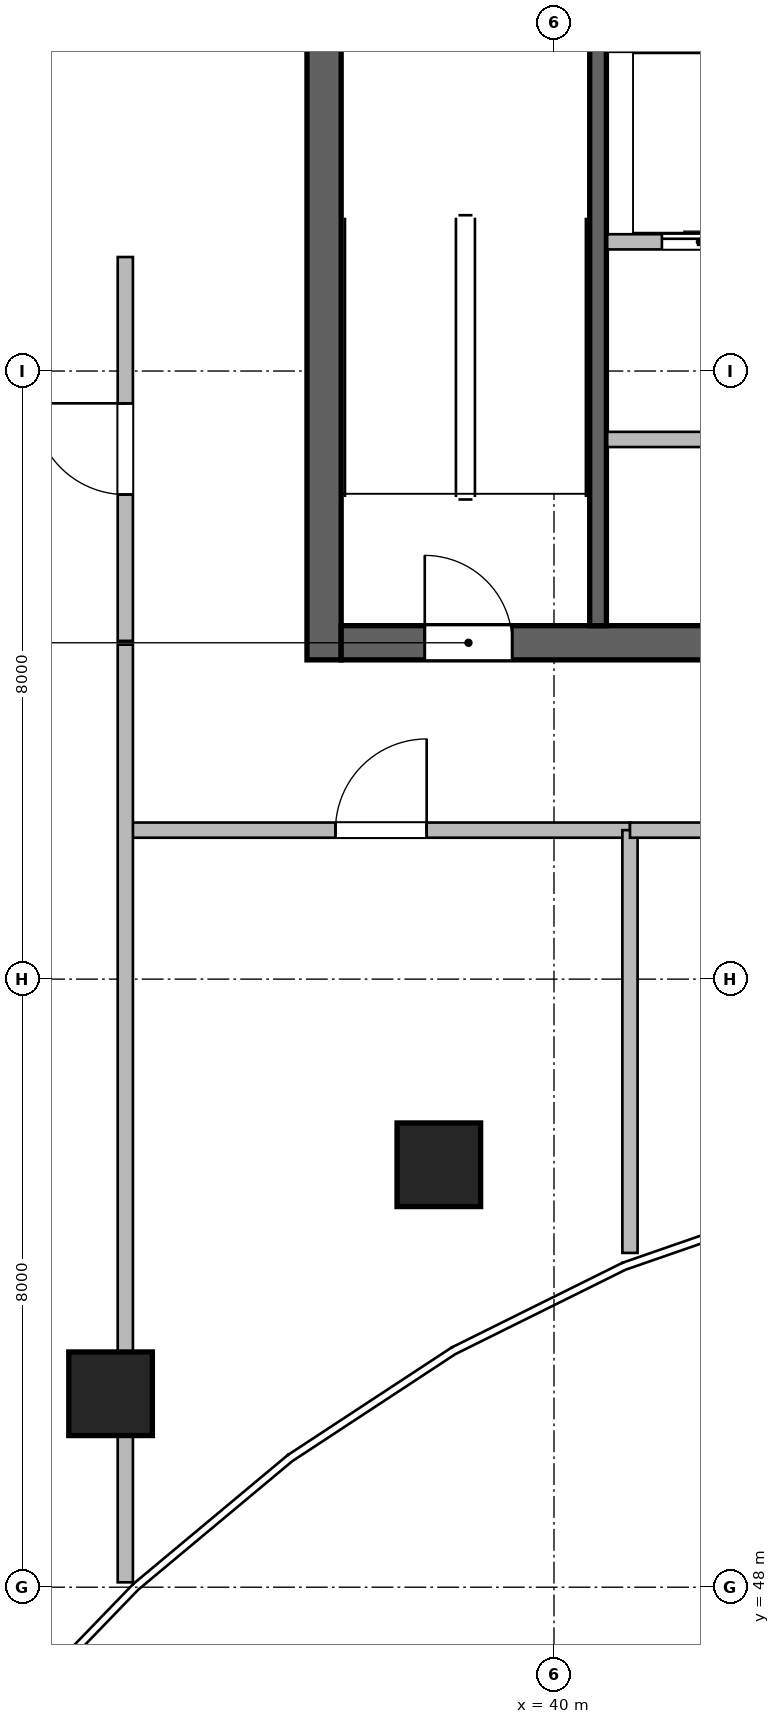
"""IFC4 building model, lengths in metres.
Left out: names, types, materials, properties, quantities, classifications, styles, units other than length and angle.
Written with IfcOpenShell. Run it as: python <this file> out.ifc"""

import sys

from ifc_helpers import new_model, si_unit, direction, frame, frame_2d, origin, origin_2d, place, context, subcontext, project, spatial, rectangle, circle, extrude, source, transform, mapped, element, fill, save


model = new_model("IFC4")
c1 = context("Model", 3, precision=1e-05, world=origin(), true_north=direction((0.0, 1.0)))
c2 = subcontext(c1, "Body", "Model", "MODEL_VIEW")
j1 = project(units=[si_unit("LENGTHUNIT", "METRE"), si_unit("PLANEANGLEUNIT", "RADIAN")], contexts=[c1])
p1 = place(None, origin())
s1 = spatial("IfcSite", under=j1, at=p1, CompositionType="ELEMENT")
p2 = place(p1, origin())
s2 = spatial("IfcBuilding", under=s1, at=p2, CompositionType="ELEMENT")
p3 = place(p2, frame((0.0, 0.0, 189.6)))
s3 = spatial("IfcBuildingStorey", under=s2, at=p3, CompositionType="ELEMENT", Elevation=189.6)
m1 = source(origin(), c2, "Body", "SweptSolid", [
    extrude(rectangle(XDim=12.0, YDim=0.45, at=frame_2d((6.0, 0.0))), origin(), (0.0, 0.0, 1.0), 4.8),
])
p4 = place(p3, frame((36.975, 60.2, 0.0), z_axis=(0.0, 0.0, 1.0), x_axis=(0.0, 1.0, 0.0)))
e1 = element("IfcWall", 1, at=p4, inside=s3, PredefinedType="SHEAR", context=c2, shape_type="MappedRepresentation", body=[
    mapped(m1, transform((0.0, 0.0, 0.0), scale=1.0)),
])
m2 = source(origin(), c2, "Body", "SweptSolid", [
    extrude(rectangle(XDim=21.6, YDim=0.45, at=frame_2d((10.8, 0.0))), origin(), (0.0, 0.0, 1.0), 4.8),
])
p5 = place(p3, frame((37.2, 60.425, 0.0), z_axis=(0.0, 0.0, 1.0), x_axis=(1.0, 0.0, 0.0)))
e2 = element("IfcWall", 2, at=p5, inside=s3, PredefinedType="SHEAR", context=c2, shape_type="MappedRepresentation", body=[
    mapped(m2, transform((0.0, 0.0, 0.0), scale=1.0)),
])
p6 = place(p5, frame((1.1, 0.0, 0.0)))
e3 = element("IfcOpeningElement", 3, at=p6, cuts=e2, PredefinedType="OPENING", context=c2, shape_type="SweptSolid", body=[
    extrude(rectangle(XDim=1.15, YDim=2.15, at=frame_2d((0.575, 1.075))), frame((0.0, 0.235, 0.0), z_axis=(0.0, -1.0, 0.0), x_axis=(1.0, 0.0, 0.0)), (0.0, 0.0, 1.0), 0.47),
])
p7 = place(p5, frame((19.5, 0.0, 0.0)))
e4 = element("IfcOpeningElement", 4, at=p7, cuts=e2, PredefinedType="OPENING", context=c2, shape_type="SweptSolid", body=[
    extrude(rectangle(XDim=0.9, YDim=2.1, at=frame_2d((0.45, 1.05))), frame((0.0, 0.235, 0.0), z_axis=(0.0, -1.0, 0.0), x_axis=(1.0, 0.0, 0.0)), (0.0, 0.0, 1.0), 0.47),
])
p8 = place(p5, frame((12.02, 0.0, 0.0)))
e5 = element("IfcOpeningElement", 5, at=p8, cuts=e2, PredefinedType="OPENING", context=c2, shape_type="SweptSolid", body=[
    extrude(rectangle(XDim=1.6, YDim=2.15, at=frame_2d((0.8, 1.075))), frame((0.0, 0.235, 0.0), z_axis=(0.0, -1.0, 0.0), x_axis=(1.0, 0.0, 0.0)), (0.0, 0.0, 1.0), 0.47),
])
m3 = source(origin(), c2, "Body", "SweptSolid", [
    extrude(rectangle(XDim=11.1, YDim=0.22, at=frame_2d((5.55, 0.0))), origin(), (0.0, 0.0, 1.0), 4.8),
])
p9 = place(p3, frame((40.58, 60.65, 0.0), z_axis=(0.0, 0.0, 1.0), x_axis=(0.0, 1.0, 0.0)))
e6 = element("IfcWall", 6, at=p9, inside=s3, PredefinedType="SHEAR", context=c2, shape_type="MappedRepresentation", body=[
    mapped(m3, transform((0.0, 0.0, 0.0), scale=1.0)),
])
m4 = source(origin(), c2, "Body", "SweptSolid", [
    extrude(circle(Radius=0.55, at=origin_2d()), origin(), (0.0, 0.0, 1.0), 4.8),
])
for number, where, z_axis, x_axis in (
    (7, (34.166, 50.545, 0.0), (0.0, 0.0, 1.0), (-0.436, 0.9, 0.0)),
    (8, (38.485, 53.558, 0.0), (0.0, 0.0, 1.0), (-0.289, 0.957, 0.0)),
):
    element("IfcColumn", number, at=place(p3, frame(where, z_axis=z_axis, x_axis=x_axis)), inside=s3, PredefinedType="COLUMN", context=c2, shape_type="MappedRepresentation", body=[
        mapped(m4, transform((0.0, 0.0, 0.0), scale=1.0)),
    ])
m5 = source(origin(), c2, "Body", "SweptSolid", [
    extrude(rectangle(XDim=8.02, YDim=0.2, at=frame_2d((4.01, 0.0))), origin(), (0.0, 0.0, 1.0), 4.48),
])
p10 = place(p3, frame((40.7, 63.1, 0.0), z_axis=(0.0, 0.0, 1.0), x_axis=(1.0, 0.0, 0.0)))
e9 = element("IfcWall", 9, at=p10, inside=s3, PredefinedType="SOLIDWALL", context=c2, shape_type="MappedRepresentation", body=[
    mapped(m5, transform((0.0, 0.0, 0.0), scale=1.0)),
])
p11 = place(p10, frame((3.4, 0.0, 0.0)))
e10 = element("IfcOpeningElement", 10, at=p11, cuts=e9, PredefinedType="OPENING", context=c2, shape_type="SweptSolid", body=[
    extrude(rectangle(XDim=0.95, YDim=2.15, at=frame_2d((0.475, 1.075))), frame((0.0, 0.11, 0.0), z_axis=(0.0, -1.0, 0.0), x_axis=(1.0, 0.0, 0.0)), (0.0, 0.0, 1.0), 0.22),
])
m6 = source(origin(), c2, "Body", "SweptSolid", [
    extrude(rectangle(XDim=8.8, YDim=0.2, at=frame_2d((4.4, 0.0))), origin(), (0.0, 0.0, 1.0), 4.48),
])
p12 = place(p3, frame((40.7, 65.7, 0.0), z_axis=(0.0, 0.0, 1.0), x_axis=(1.0, 0.0, 0.0)))
e11 = element("IfcWall", 11, at=p12, inside=s3, PredefinedType="SOLIDWALL", context=c2, shape_type="MappedRepresentation", body=[
    mapped(m6, transform((0.0, 0.0, 0.0), scale=1.0)),
])
p13 = place(p12, frame((0.72, 0.0, 0.0)))
e12 = element("IfcOpeningElement", 12, at=p13, cuts=e11, PredefinedType="OPENING", context=c2, shape_type="SweptSolid", body=[
    extrude(rectangle(XDim=1.0, YDim=2.15, at=frame_2d((0.5, 1.075))), frame((0.0, 0.11, 0.0), z_axis=(0.0, -1.0, 0.0), x_axis=(1.0, 0.0, 0.0)), (0.0, 0.0, 1.0), 0.22),
])
p14 = place(p12, frame((2.62, 0.0, 0.0)))
e13 = element("IfcOpeningElement", 13, at=p14, cuts=e11, PredefinedType="OPENING", context=c2, shape_type="SweptSolid", body=[
    extrude(rectangle(XDim=1.0, YDim=2.15, at=frame_2d((0.5, 1.075))), frame((0.0, 0.11, 0.0), z_axis=(0.0, -1.0, 0.0), x_axis=(1.0, 0.0, 0.0)), (0.0, 0.0, 1.0), 0.22),
])
p15 = place(p12, frame((4.55, 0.0, 0.0)))
e14 = element("IfcOpeningElement", 14, at=p15, cuts=e11, PredefinedType="OPENING", context=c2, shape_type="SweptSolid", body=[
    extrude(rectangle(XDim=1.0, YDim=2.15, at=frame_2d((0.5, 1.075))), frame((0.0, 0.11, 0.0), z_axis=(0.0, -1.0, 0.0), x_axis=(1.0, 0.0, 0.0)), (0.0, 0.0, 1.0), 0.22),
])
p16 = place(p12, frame((6.55, 0.0, 0.0)))
e15 = element("IfcOpeningElement", 15, at=p16, cuts=e11, PredefinedType="OPENING", context=c2, shape_type="SweptSolid", body=[
    extrude(rectangle(XDim=1.0, YDim=2.15, at=frame_2d((0.5, 1.075))), frame((0.0, 0.11, 0.0), z_axis=(0.0, -1.0, 0.0), x_axis=(1.0, 0.0, 0.0)), (0.0, 0.0, 1.0), 0.22),
])
m7 = source(origin(), c2, "Body", "SweptSolid", [
    extrude(rectangle(XDim=6.55, YDim=0.2, at=frame_2d((3.275, 0.0))), origin(), (0.0, 0.0, 1.0), 4.48),
])
p17 = place(p3, frame((34.45, 57.96, 0.0), z_axis=(0.0, 0.0, 1.0), x_axis=(1.0, 0.0, 0.0)))
e16 = element("IfcWall", 16, at=p17, inside=s3, PredefinedType="SOLIDWALL", context=c2, shape_type="MappedRepresentation", body=[
    mapped(m7, transform((0.0, 0.0, 0.0), scale=1.0)),
])
p18 = place(p17, frame((2.675, 0.0, 0.0)))
e17 = element("IfcOpeningElement", 17, at=p18, cuts=e16, PredefinedType="OPENING", context=c2, shape_type="SweptSolid", body=[
    extrude(rectangle(XDim=1.2, YDim=2.15, at=frame_2d((0.6, 1.075))), frame((0.0, 0.11, 0.0), z_axis=(0.0, -1.0, 0.0), x_axis=(1.0, 0.0, 0.0)), (0.0, 0.0, 1.0), 0.22),
])
m8 = source(origin(), c2, "Body", "SweptSolid", [
    extrude(rectangle(XDim=5.562, YDim=0.2, at=frame_2d((2.781, 0.0))), origin(), (0.0, 0.0, 1.0), 4.48),
])
p19 = place(p3, frame((41.0, 52.398, 0.0), z_axis=(0.0, 0.0, 1.0), x_axis=(0.0, 1.0, 0.0)))
e18 = element("IfcWall", 18, at=p19, inside=s3, PredefinedType="SOLIDWALL", context=c2, shape_type="MappedRepresentation", body=[
    mapped(m8, transform((0.0, 0.0, 0.0), scale=1.0)),
])
m9 = source(origin(), c2, "Body", "SweptSolid", [
    extrude(rectangle(XDim=6.6, YDim=0.2, at=frame_2d((3.3, 0.0))), origin(), (0.0, 0.0, 1.0), 3.925),
])
p20 = place(p3, frame((41.0, 57.96, 0.0), z_axis=(0.0, 0.0, 1.0), x_axis=(1.0, 0.0, 0.0)))
e19 = element("IfcWall", 19, at=p20, inside=s3, PredefinedType="SOLIDWALL", context=c2, shape_type="MappedRepresentation", body=[
    mapped(m9, transform((0.0, 0.0, 0.0), scale=1.0)),
])
p21 = place(p20, frame((2.7, 0.0, 0.0)))
e20 = element("IfcOpeningElement", 20, at=p21, cuts=e19, PredefinedType="OPENING", context=c2, shape_type="SweptSolid", body=[
    extrude(rectangle(XDim=1.2, YDim=2.15, at=frame_2d((0.6, 1.075))), frame((0.0, 0.11, 0.0), z_axis=(0.0, -1.0, 0.0), x_axis=(1.0, 0.0, 0.0)), (0.0, 0.0, 1.0), 0.22),
])
m10 = source(origin(), c2, "Body", "SweptSolid", [
    extrude(rectangle(XDim=12.336, YDim=0.2, at=frame_2d((6.168, 0.0))), origin(), (0.0, 0.0, 1.0), 4.48),
])
p22 = place(p3, frame((34.36, 48.064, 0.0), z_axis=(0.0, 0.0, 1.0), x_axis=(0.0, 1.0, 0.0)))
e21 = element("IfcWall", 21, at=p22, inside=s3, PredefinedType="SOLIDWALL", context=c2, shape_type="MappedRepresentation", body=[
    mapped(m10, transform((0.0, 0.0, 0.0), scale=1.0)),
])
m11 = source(origin(), c2, "Body", "SweptSolid", [
    extrude(rectangle(XDim=5.05, YDim=0.2, at=frame_2d((2.525, 0.0))), origin(), (0.0, 0.0, 1.0), 4.48),
])
p23 = place(p3, frame((34.36, 60.45, 0.0), z_axis=(0.0, 0.0, 1.0), x_axis=(0.0, 1.0, 0.0)))
e22 = element("IfcWall", 22, at=p23, inside=s3, PredefinedType="SOLIDWALL", context=c2, shape_type="MappedRepresentation", body=[
    mapped(m11, transform((0.0, 0.0, 0.0), scale=1.0)),
])
p24 = place(p23, frame((1.925, 0.0, 0.0)))
e23 = element("IfcOpeningElement", 23, at=p24, cuts=e22, PredefinedType="OPENING", context=c2, shape_type="SweptSolid", body=[
    extrude(rectangle(XDim=1.2, YDim=2.15, at=frame_2d((0.6, 1.075))), frame((0.0, 0.11, 0.0), z_axis=(0.0, -1.0, 0.0), x_axis=(1.0, 0.0, 0.0)), (0.0, 0.0, 1.0), 0.22),
])
m12 = source(origin(), c2, "Body", "SweptSolid", [
    extrude(rectangle(XDim=1.15, YDim=2.15, at=frame_2d((0.575, 1.075))), frame((0.0, 0.025, 0.0), z_axis=(0.0, -1.0, 0.0), x_axis=(1.0, 0.0, 0.0)), (0.0, 0.0, 1.0), 0.05),
])
p25 = place(p6, origin())
e24 = element("IfcDoor", 24, at=p25, inside=s3, OperationType="SINGLE_SWING_LEFT", PredefinedType="DOOR", context=c2, shape_type="MappedRepresentation", body=[
    mapped(m12, transform((0.0, 0.0, 0.0), scale=1.0)),
])
fill(e3, e24)
m13 = source(origin(), c2, "Body", "SweptSolid", [
    extrude(rectangle(XDim=1.0, YDim=2.15, at=frame_2d((0.5, 1.075))), frame((0.0, 0.025, 0.0), z_axis=(0.0, -1.0, 0.0), x_axis=(1.0, 0.0, 0.0)), (0.0, 0.0, 1.0), 0.05),
])
p26 = place(p13, origin())
e25 = element("IfcDoor", 25, at=p26, inside=s3, OperationType="DOUBLE_DOOR_SLIDING", PredefinedType="DOOR", context=c2, shape_type="MappedRepresentation", body=[
    mapped(m13, transform((0.0, 0.0, 0.0), scale=1.0)),
])
fill(e12, e25)
m14 = source(origin(), c2, "Body", "SweptSolid", [
    extrude(rectangle(XDim=1.2, YDim=2.15, at=frame_2d((0.6, 1.075))), frame((0.0, 0.025, 0.0), z_axis=(0.0, -1.0, 0.0), x_axis=(1.0, 0.0, 0.0)), (0.0, 0.0, 1.0), 0.05),
])
p27 = place(p18, origin())
e26 = element("IfcDoor", 26, at=p27, inside=s3, OperationType="SINGLE_SWING_RIGHT", PredefinedType="DOOR", context=c2, shape_type="MappedRepresentation", body=[
    mapped(m14, transform((0.0, 0.0, 0.0), scale=1.0)),
])
fill(e17, e26)
p28 = place(p24, origin())
e27 = element("IfcDoor", 27, at=p28, inside=s3, OperationType="SINGLE_SWING_RIGHT", PredefinedType="DOOR", context=c2, shape_type="MappedRepresentation", body=[
    mapped(m14, transform((0.0, 0.0, 0.0), scale=1.0)),
])
fill(e23, e27)
save(model, sys.argv[1])
